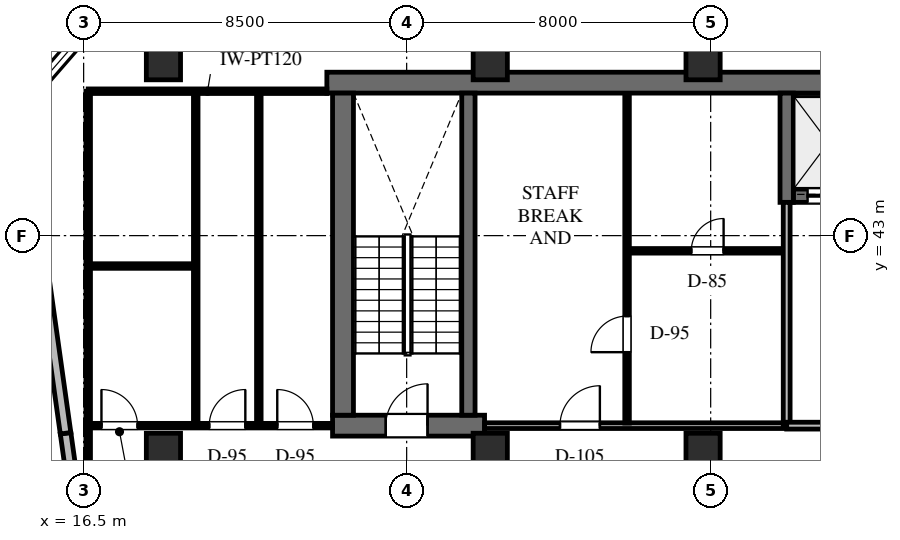
"""IFC4 building model, lengths in metres.
Left out: names, types, materials, properties, quantities, classifications, styles, units other than length and angle.
Written with IfcOpenShell. Run it as: python <this file> out.ifc"""

import sys

from ifc_helpers import new_model, si_unit, direction, frame, frame_2d, origin, origin_2d, place, context, subcontext, project, spatial, rectangle, extrude, element, fill, save


model = new_model("IFC4")
c1 = context("Model", 3, precision=1e-05, world=origin(), true_north=direction((0.0, 1.0)))
c2 = subcontext(c1, "Body", "Model", "MODEL_VIEW")
j1 = project(units=[si_unit("LENGTHUNIT", "METRE"), si_unit("PLANEANGLEUNIT", "RADIAN")], contexts=[c1])
p1 = place(None, origin())
s1 = spatial("IfcSite", under=j1, at=p1, CompositionType="ELEMENT")
p2 = place(p1, origin())
s2 = spatial("IfcBuilding", under=s1, at=p2, CompositionType="ELEMENT")
p3 = place(p2, frame((0.0, 0.0, 168.5)))
s3 = spatial("IfcBuildingStorey", under=s2, at=p3, CompositionType="ELEMENT", Elevation=168.5)
p4 = place(p3, frame((22.9, 47.025, 0.0), z_axis=(0.0, 0.0, 1.0), x_axis=(1.0, 0.0, 0.0)))
e1 = element("IfcWall", 1, at=p4, inside=s3, PredefinedType="SHEAR", context=c2, shape_type="SweptSolid", body=[
    extrude(rectangle(XDim=43.5, YDim=0.55, at=frame_2d((21.75, 0.0))), origin(), (0.0, 0.0, 1.0), 4.0),
])
p5 = place(p3, frame((35.175, 44.05, 0.0), z_axis=(0.0, 0.0, 1.0), x_axis=(1.0, 0.0, 0.0)))
e2 = element("IfcWall", 2, at=p5, inside=s3, PredefinedType="SHEAR", context=c2, shape_type="SweptSolid", body=[
    extrude(rectangle(XDim=9.7, YDim=0.35, at=frame_2d((4.85, 0.0))), origin(), (0.0, 0.0, 1.0), 4.0),
])
p6 = place(p5, frame((0.375, 0.0, 0.0)))
e3 = element("IfcOpeningElement", 3, at=p6, cuts=e2, PredefinedType="OPENING", context=c2, shape_type="SweptSolid", body=[
    extrude(rectangle(XDim=1.1, YDim=2.2, at=frame_2d((0.55, 1.1))), frame((0.0, 0.185, 0.0), z_axis=(0.0, -1.0, 0.0), x_axis=(1.0, 0.0, 0.0)), (0.0, 0.0, 1.0), 0.37),
])
p7 = place(p5, frame((2.375, 0.0, 0.0)))
e4 = element("IfcOpeningElement", 4, at=p7, cuts=e2, PredefinedType="OPENING", context=c2, shape_type="SweptSolid", body=[
    extrude(rectangle(XDim=1.1, YDim=2.2, at=frame_2d((0.55, 1.1))), frame((0.0, 0.185, 0.0), z_axis=(0.0, -1.0, 0.0), x_axis=(1.0, 0.0, 0.0)), (0.0, 0.0, 1.0), 0.37),
])
p8 = place(p5, frame((4.375, 0.0, 0.0)))
e5 = element("IfcOpeningElement", 5, at=p8, cuts=e2, PredefinedType="OPENING", context=c2, shape_type="SweptSolid", body=[
    extrude(rectangle(XDim=1.1, YDim=2.2, at=frame_2d((0.55, 1.1))), frame((0.0, 0.185, 0.0), z_axis=(0.0, -1.0, 0.0), x_axis=(1.0, 0.0, 0.0)), (0.0, 0.0, 1.0), 0.37),
])
p9 = place(p5, frame((6.375, 0.0, 0.0)))
e6 = element("IfcOpeningElement", 6, at=p9, cuts=e2, PredefinedType="OPENING", context=c2, shape_type="SweptSolid", body=[
    extrude(rectangle(XDim=1.1, YDim=2.2, at=frame_2d((0.55, 1.1))), frame((0.0, 0.185, 0.0), z_axis=(0.0, -1.0, 0.0), x_axis=(1.0, 0.0, 0.0)), (0.0, 0.0, 1.0), 0.37),
])
p10 = place(p3, frame((35.0, 43.875, 0.0), z_axis=(0.0, 0.0, 1.0), x_axis=(0.0, 1.0, 0.0)))
e7 = element("IfcWall", 7, at=p10, inside=s3, PredefinedType="SHEAR", context=c2, shape_type="SweptSolid", body=[
    extrude(rectangle(XDim=2.875, YDim=0.35, at=frame_2d((1.438, 0.0))), origin(), (0.0, 0.0, 1.0), 4.0),
])
p11 = place(p3, frame((23.05, 38.0, 0.0), z_axis=(0.0, 0.0, 1.0), x_axis=(1.0, 0.0, 0.0)))
e8 = element("IfcWall", 8, at=p11, inside=s3, PredefinedType="SHEAR", context=c2, shape_type="SweptSolid", body=[
    extrude(rectangle(XDim=4.0, YDim=0.55, at=frame_2d((2.0, 0.0))), origin(), (0.0, 0.0, 1.0), 4.0),
])
p12 = place(p11, frame((1.4, 0.0, 0.0)))
e9 = element("IfcOpeningElement", 9, at=p12, cuts=e8, PredefinedType="OPENING", context=c2, shape_type="SweptSolid", body=[
    extrude(rectangle(XDim=1.1, YDim=2.2, at=frame_2d((0.55, 1.1))), frame((0.0, 0.285, 0.0), z_axis=(0.0, -1.0, 0.0), x_axis=(1.0, 0.0, 0.0)), (0.0, 0.0, 1.0), 0.57),
])
p13 = place(p3, frame((23.325, 38.275, 0.0), z_axis=(0.0, 0.0, 1.0), x_axis=(0.0, 1.0, 0.0)))
e10 = element("IfcWall", 10, at=p13, inside=s3, PredefinedType="SHEAR", context=c2, shape_type="SweptSolid", body=[
    extrude(rectangle(XDim=8.475, YDim=0.55, at=frame_2d((4.238, 0.0))), origin(), (0.0, 0.0, 1.0), 4.0),
])
p14 = place(p3, frame((26.625, 38.275, 0.0), z_axis=(0.0, 0.0, 1.0), x_axis=(0.0, 1.0, 0.0)))
e11 = element("IfcWall", 11, at=p14, inside=s3, PredefinedType="SHEAR", context=c2, shape_type="SweptSolid", body=[
    extrude(rectangle(XDim=8.475, YDim=0.35, at=frame_2d((4.238, 0.0))), origin(), (0.0, 0.0, 1.0), 4.0),
])
for number, where, z_axis, x_axis in (
    (12, (32.8, 37.35, 0.0), (0.0, 0.0, 1.0), (1.0, 0.0, 0.0)),
    (13, (32.8, 47.55, 0.0), (0.0, 0.0, 1.0), (1.0, 0.0, 0.0)),
    (14, (27.2, 37.35, 0.0), (0.0, 0.0, 1.0), (1.0, 0.0, 0.0)),
    (15, (27.2, 47.55, 0.0), (0.0, 0.0, 1.0), (1.0, 0.0, 0.0)),
    (16, (18.6, 37.35, 0.0), (0.0, 0.0, 1.0), (1.0, 0.0, 0.0)),
    (17, (18.6, 47.55, 0.0), (0.0, 0.0, 1.0), (1.0, 0.0, 0.0)),
):
    element("IfcColumn", number, at=place(p3, frame(where, z_axis=z_axis, x_axis=x_axis)), inside=s3, PredefinedType="COLUMN", context=c2, shape_type="SweptSolid", body=[
        extrude(rectangle(XDim=0.9, YDim=0.9, at=origin_2d()), origin(), (0.0, 0.0, 1.0), 4.0),
    ])
p15 = place(p3, frame((19.434, 13.541, 0.0), z_axis=(0.0, 0.0, 1.0), x_axis=(-0.139173290738, 0.99026804207, 0.0)))
e18 = element("IfcWall", 18, at=p15, inside=s3, PredefinedType="STANDARD", context=c2, shape_type="SweptSolid", body=[
    extrude(rectangle(XDim=24.498, YDim=0.28, at=frame_2d((12.249, 0.0))), origin(), (0.0, 0.0, 1.0), 3.755),
])
p16 = place(p15, frame((15.057, 0.0, 0.0)))
e19 = element("IfcOpeningElement", 19, at=p16, cuts=e18, PredefinedType="OPENING", context=c2, shape_type="SweptSolid", body=[
    extrude(rectangle(XDim=1.0, YDim=2.15, at=frame_2d((0.5, 1.075))), frame((0.0, 0.15, 0.0), z_axis=(0.0, -1.0, 0.0), x_axis=(1.0, 0.0, 0.0)), (0.0, 0.0, 1.0), 0.3),
])
p17 = place(p15, frame((7.006, 0.0, 0.65)))
e20 = element("IfcOpeningElement", 20, at=p17, cuts=e18, PredefinedType="OPENING", context=c2, shape_type="SweptSolid", body=[
    extrude(rectangle(XDim=1.8, YDim=2.1, at=frame_2d((0.9, 1.05))), frame((0.0, 0.15, 0.0), z_axis=(0.0, -1.0, 0.0), x_axis=(1.0, 0.0, 0.0)), (0.0, 0.0, 1.0), 0.3),
])
p18 = place(p15, frame((18.708, 0.0, 0.65)))
e21 = element("IfcOpeningElement", 21, at=p18, cuts=e18, PredefinedType="OPENING", context=c2, shape_type="SweptSolid", body=[
    extrude(rectangle(XDim=1.8, YDim=2.1, at=frame_2d((0.9, 1.05))), frame((0.0, 0.15, 0.0), z_axis=(0.0, -1.0, 0.0), x_axis=(1.0, 0.0, 0.0)), (0.0, 0.0, 1.0), 0.3),
])
p19 = place(p3, frame((16.025, 37.8, 0.0), z_axis=(0.0, 0.0, 1.0), x_axis=(-0.13918102754, 0.990266954701, 0.0)))
e22 = element("IfcWall", 22, at=p19, inside=s3, PredefinedType="STANDARD", context=c2, shape_type="SweptSolid", body=[
    extrude(rectangle(XDim=8.667, YDim=0.28, at=frame_2d((4.333, 0.0))), origin(), (0.0, 0.0, 1.0), 3.755),
])
p20 = place(p19, frame((3.374, 0.0, 0.65)))
e23 = element("IfcOpeningElement", 23, at=p20, cuts=e22, PredefinedType="OPENING", context=c2, shape_type="SweptSolid", body=[
    extrude(rectangle(XDim=1.8, YDim=2.1, at=frame_2d((0.9, 1.05))), frame((0.0, 0.15, 0.0), z_axis=(0.0, -1.0, 0.0), x_axis=(1.0, 0.0, 0.0)), (0.0, 0.0, 1.0), 0.3),
])
p21 = place(p3, frame((14.819, 46.383, 0.0), z_axis=(0.0, 0.0, 1.0), x_axis=(0.656071351282, 0.754698868442, 0.0)))
e24 = element("IfcWall", 24, at=p21, inside=s3, PredefinedType="STANDARD", context=c2, shape_type="SweptSolid", body=[
    extrude(rectangle(XDim=2.646, YDim=0.28, at=frame_2d((1.323, 0.0))), origin(), (0.0, 0.0, 1.0), 3.755),
])
p22 = place(p21, frame((0.416, 0.0, 0.65)))
e25 = element("IfcOpeningElement", 25, at=p22, cuts=e24, PredefinedType="OPENING", context=c2, shape_type="SweptSolid", body=[
    extrude(rectangle(XDim=1.8, YDim=2.1, at=frame_2d((0.9, 1.05))), frame((0.0, 0.15, 0.0), z_axis=(0.0, -1.0, 0.0), x_axis=(1.0, 0.0, 0.0)), (0.0, 0.0, 1.0), 0.3),
])
p23 = place(p3, frame((27.05, 38.0, 0.0), z_axis=(0.0, 0.0, 1.0), x_axis=(1.0, 0.0, 0.0)))
e26 = element("IfcWall", 26, at=p23, inside=s3, PredefinedType="PARTITIONING", context=c2, shape_type="SweptSolid", body=[
    extrude(rectangle(XDim=7.95, YDim=0.15, at=frame_2d((3.975, 0.0))), origin(), (0.0, 0.0, 1.0), 2.982),
])
p24 = place(p23, frame((1.985, 0.0, 0.0)))
e27 = element("IfcOpeningElement", 27, at=p24, cuts=e26, PredefinedType="OPENING", context=c2, shape_type="SweptSolid", body=[
    extrude(rectangle(XDim=1.05, YDim=2.2, at=frame_2d((0.525, 1.1))), frame((0.0, 0.085, 0.0), z_axis=(0.0, -1.0, 0.0), x_axis=(1.0, 0.0, 0.0)), (0.0, 0.0, 1.0), 0.17),
])
p25 = place(p3, frame((35.0, 38.0, 0.0), z_axis=(0.0, 0.0, 1.0), x_axis=(0.0, 1.0, 0.0)))
e28 = element("IfcWall", 28, at=p25, inside=s3, PredefinedType="STANDARD", context=c2, shape_type="SweptSolid", body=[
    extrude(rectangle(XDim=5.875, YDim=0.18, at=frame_2d((2.938, 0.0))), origin(), (0.0, 0.0, 1.0), 3.755),
])
p26 = place(p3, frame((30.8, 38.068, 0.0), z_axis=(0.0, 0.0, 1.0), x_axis=(0.0, 1.0, 0.0)))
e29 = element("IfcWall", 29, at=p26, inside=s3, PredefinedType="PARTITIONING", context=c2, shape_type="SweptSolid", body=[
    extrude(rectangle(XDim=8.674, YDim=0.12, at=frame_2d((4.337, 0.0))), origin(), (0.0, 0.0, 1.0), 3.755),
])
p27 = place(p26, frame((1.865, 0.0, 0.0)))
e30 = element("IfcOpeningElement", 30, at=p27, cuts=e29, PredefinedType="OPENING", context=c2, shape_type="SweptSolid", body=[
    extrude(rectangle(XDim=0.95, YDim=2.15, at=frame_2d((0.475, 1.075))), frame((0.0, 0.07, 0.0), z_axis=(0.0, -1.0, 0.0), x_axis=(1.0, 0.0, 0.0)), (0.0, 0.0, 1.0), 0.14),
])
p28 = place(p3, frame((30.868, 42.6, 0.0), z_axis=(0.0, 0.0, 1.0), x_axis=(1.0, 0.0, 0.0)))
e31 = element("IfcWall", 31, at=p28, inside=s3, PredefinedType="PARTITIONING", context=c2, shape_type="SweptSolid", body=[
    extrude(rectangle(XDim=4.014, YDim=0.12, at=frame_2d((2.007, 0.0))), origin(), (0.0, 0.0, 1.0), 2.982),
])
p29 = place(p28, frame((1.622, 0.0, 0.0)))
e32 = element("IfcOpeningElement", 32, at=p29, cuts=e31, PredefinedType="OPENING", context=c2, shape_type="SweptSolid", body=[
    extrude(rectangle(XDim=0.85, YDim=2.1, at=frame_2d((0.425, 1.05))), frame((0.0, 0.07, 0.0), z_axis=(0.0, -1.0, 0.0), x_axis=(1.0, 0.0, 0.0)), (0.0, 0.0, 1.0), 0.14),
])
p30 = place(p3, frame((35.0, 38.0, 0.0), z_axis=(0.0, 0.0, 1.0), x_axis=(1.0, 0.0, 0.0)))
e33 = element("IfcWall", 33, at=p30, inside=s3, PredefinedType="STANDARD", context=c2, shape_type="SweptSolid", body=[
    extrude(rectangle(XDim=10.05, YDim=0.18, at=frame_2d((5.025, 0.0))), origin(), (0.0, 0.0, 1.0), 2.982),
])
p31 = place(p30, frame((5.858, 0.0, 0.0)))
e34 = element("IfcOpeningElement", 34, at=p31, cuts=e33, PredefinedType="OPENING", context=c2, shape_type="SweptSolid", body=[
    extrude(rectangle(XDim=1.8, YDim=2.2, at=frame_2d((0.9, 1.1))), frame((0.0, 0.1, 0.0), z_axis=(0.0, -1.0, 0.0), x_axis=(1.0, 0.0, 0.0)), (0.0, 0.0, 1.0), 0.2),
])
p32 = place(p3, frame((16.62, 38.0, 0.0), z_axis=(0.0, 0.0, 1.0), x_axis=(1.0, 0.0, 0.0)))
e35 = element("IfcWall", 35, at=p32, inside=s3, PredefinedType="PARTITIONING", context=c2, shape_type="SweptSolid", body=[
    extrude(rectangle(XDim=6.43, YDim=0.12, at=frame_2d((3.215, 0.0))), origin(), (0.0, 0.0, 1.0), 2.982),
])
p33 = place(p32, frame((0.349, 0.0, 0.0)))
e36 = element("IfcOpeningElement", 36, at=p33, cuts=e35, PredefinedType="OPENING", context=c2, shape_type="SweptSolid", body=[
    extrude(rectangle(XDim=0.95, YDim=2.15, at=frame_2d((0.475, 1.075))), frame((0.0, 0.07, 0.0), z_axis=(0.0, -1.0, 0.0), x_axis=(1.0, 0.0, 0.0)), (0.0, 0.0, 1.0), 0.14),
])
p34 = place(p32, frame((3.185, 0.0, 0.0)))
e37 = element("IfcOpeningElement", 37, at=p34, cuts=e35, PredefinedType="OPENING", context=c2, shape_type="SweptSolid", body=[
    extrude(rectangle(XDim=0.95, YDim=2.15, at=frame_2d((0.475, 1.075))), frame((0.0, 0.07, 0.0), z_axis=(0.0, -1.0, 0.0), x_axis=(1.0, 0.0, 0.0)), (0.0, 0.0, 1.0), 0.14),
])
p35 = place(p32, frame((4.975, 0.0, 0.0)))
e38 = element("IfcOpeningElement", 38, at=p35, cuts=e35, PredefinedType="OPENING", context=c2, shape_type="SweptSolid", body=[
    extrude(rectangle(XDim=0.95, YDim=2.15, at=frame_2d((0.475, 1.075))), frame((0.0, 0.07, 0.0), z_axis=(0.0, -1.0, 0.0), x_axis=(1.0, 0.0, 0.0)), (0.0, 0.0, 1.0), 0.14),
])
p36 = place(p3, frame((16.62, 38.0, 0.0), z_axis=(0.0, 0.0, 1.0), x_axis=(0.0, 1.0, 0.0)))
e39 = element("IfcWall", 39, at=p36, inside=s3, PredefinedType="PARTITIONING", context=c2, shape_type="SweptSolid", body=[
    extrude(rectangle(XDim=8.8, YDim=0.12, at=frame_2d((4.4, 0.0))), origin(), (0.0, 0.0, 1.0), 3.755),
])
p37 = place(p3, frame((16.62, 46.8, 0.0), z_axis=(0.0, 0.0, 1.0), x_axis=(1.0, 0.0, 0.0)))
e40 = element("IfcWall", 40, at=p37, inside=s3, PredefinedType="PARTITIONING", context=c2, shape_type="SweptSolid", body=[
    extrude(rectangle(XDim=6.28, YDim=0.12, at=frame_2d((3.14, 0.0))), origin(), (0.0, 0.0, 1.0), 2.982),
])
for number, where, z_axis, x_axis in (
    (41, (19.45, 38.068, 0.0), (0.0, 0.0, 1.0), (0.0, 1.0, 0.0)),
    (42, (21.11, 38.068, 0.0), (0.0, 0.0, 1.0), (0.0, 1.0, 0.0)),
):
    element("IfcWall", number, at=place(p3, frame(where, z_axis=z_axis, x_axis=x_axis)), inside=s3, PredefinedType="PARTITIONING", context=c2, shape_type="SweptSolid", body=[
        extrude(rectangle(XDim=8.664, YDim=0.12, at=frame_2d((4.332, 0.0))), origin(), (0.0, 0.0, 1.0), 3.755),
    ])
p38 = place(p3, frame((16.688, 42.2, 0.0), z_axis=(0.0, 0.0, 1.0), x_axis=(1.0, 0.0, 0.0)))
e43 = element("IfcWall", 43, at=p38, inside=s3, PredefinedType="PARTITIONING", context=c2, shape_type="SweptSolid", body=[
    extrude(rectangle(XDim=2.694, YDim=0.12, at=frame_2d((1.347, 0.0))), origin(), (0.0, 0.0, 1.0), 2.982),
])
p39 = place(p3, frame((16.62, 34.752, 0.0), z_axis=(0.0, 0.0, 1.0), x_axis=(0.0, 1.0, 0.0)))
e44 = element("IfcWall", 44, at=p39, inside=s3, PredefinedType="PARTITIONING", context=c2, shape_type="SweptSolid", body=[
    extrude(rectangle(XDim=3.298, YDim=0.12, at=frame_2d((1.649, 0.0))), origin(), (0.0, 0.0, 1.0), 3.755),
])
p40 = place(p22, origin())
e45 = element("IfcWindow", 45, at=p40, inside=s3, PartitioningType="SINGLE_PANEL", PredefinedType="WINDOW", context=c2, shape_type="SweptSolid", body=[
    extrude(rectangle(XDim=1.8, YDim=2.1, at=frame_2d((0.9, 1.05))), frame((0.0, 0.03, 0.0), z_axis=(0.0, -1.0, 0.0), x_axis=(1.0, 0.0, 0.0)), (0.0, 0.0, 1.0), 0.06),
])
fill(e25, e45)
p41 = place(p12, origin())
e46 = element("IfcDoor", 46, at=p41, inside=s3, OperationType="SINGLE_SWING_RIGHT", PredefinedType="DOOR", context=c2, shape_type="SweptSolid", body=[
    extrude(rectangle(XDim=1.1, YDim=2.2, at=frame_2d((0.55, 1.1))), frame((0.0, 0.025, 0.0), z_axis=(0.0, -1.0, 0.0), x_axis=(1.0, 0.0, 0.0)), (0.0, 0.0, 1.0), 0.05),
])
fill(e9, e46)
p42 = place(p6, origin())
e47 = element("IfcDoor", 47, at=p42, inside=s3, OperationType="DOUBLE_DOOR_SLIDING", PredefinedType="DOOR", context=c2, shape_type="SweptSolid", body=[
    extrude(rectangle(XDim=1.1, YDim=2.2, at=frame_2d((0.55, 1.1))), frame((0.0, 0.025, 0.0), z_axis=(0.0, -1.0, 0.0), x_axis=(1.0, 0.0, 0.0)), (0.0, 0.0, 1.0), 0.05),
])
fill(e3, e47)
p43 = place(p24, origin())
e48 = element("IfcDoor", 48, at=p43, inside=s3, OperationType="SINGLE_SWING_RIGHT", PredefinedType="DOOR", context=c2, shape_type="SweptSolid", body=[
    extrude(rectangle(XDim=1.05, YDim=2.2, at=frame_2d((0.525, 1.1))), frame((0.0, 0.025, 0.0), z_axis=(0.0, -1.0, 0.0), x_axis=(1.0, 0.0, 0.0)), (0.0, 0.0, 1.0), 0.05),
])
fill(e27, e48)
p44 = place(p27, origin())
e49 = element("IfcDoor", 49, at=p44, inside=s3, OperationType="SINGLE_SWING_LEFT", PredefinedType="DOOR", context=c2, shape_type="SweptSolid", body=[
    extrude(rectangle(XDim=0.95, YDim=2.15, at=frame_2d((0.475, 1.075))), frame((0.0, 0.025, 0.0), z_axis=(0.0, -1.0, 0.0), x_axis=(1.0, 0.0, 0.0)), (0.0, 0.0, 1.0), 0.05),
])
fill(e30, e49)
p45 = place(p29, origin())
e50 = element("IfcDoor", 50, at=p45, inside=s3, OperationType="SINGLE_SWING_RIGHT", PredefinedType="DOOR", context=c2, shape_type="SweptSolid", body=[
    extrude(rectangle(XDim=0.85, YDim=2.1, at=frame_2d((0.425, 1.05))), frame((0.0, 0.025, 0.0), z_axis=(0.0, -1.0, 0.0), x_axis=(1.0, 0.0, 0.0)), (0.0, 0.0, 1.0), 0.05),
])
fill(e32, e50)
p46 = place(p33, origin())
e51 = element("IfcDoor", 51, at=p46, inside=s3, OperationType="SINGLE_SWING_LEFT", PredefinedType="DOOR", context=c2, shape_type="SweptSolid", body=[
    extrude(rectangle(XDim=0.95, YDim=2.15, at=frame_2d((0.475, 1.075))), frame((0.0, 0.025, 0.0), z_axis=(0.0, -1.0, 0.0), x_axis=(1.0, 0.0, 0.0)), (0.0, 0.0, 1.0), 0.05),
])
fill(e36, e51)
p47 = place(p34, origin())
e52 = element("IfcDoor", 52, at=p47, inside=s3, OperationType="SINGLE_SWING_RIGHT", PredefinedType="DOOR", context=c2, shape_type="SweptSolid", body=[
    extrude(rectangle(XDim=0.95, YDim=2.15, at=frame_2d((0.475, 1.075))), frame((0.0, 0.025, 0.0), z_axis=(0.0, -1.0, 0.0), x_axis=(1.0, 0.0, 0.0)), (0.0, 0.0, 1.0), 0.05),
])
fill(e37, e52)
p48 = place(p35, origin())
e53 = element("IfcDoor", 53, at=p48, inside=s3, OperationType="SINGLE_SWING_LEFT", PredefinedType="DOOR", context=c2, shape_type="SweptSolid", body=[
    extrude(rectangle(XDim=0.95, YDim=2.15, at=frame_2d((0.475, 1.075))), frame((0.0, 0.025, 0.0), z_axis=(0.0, -1.0, 0.0), x_axis=(1.0, 0.0, 0.0)), (0.0, 0.0, 1.0), 0.05),
])
fill(e38, e53)
save(model, sys.argv[1])
